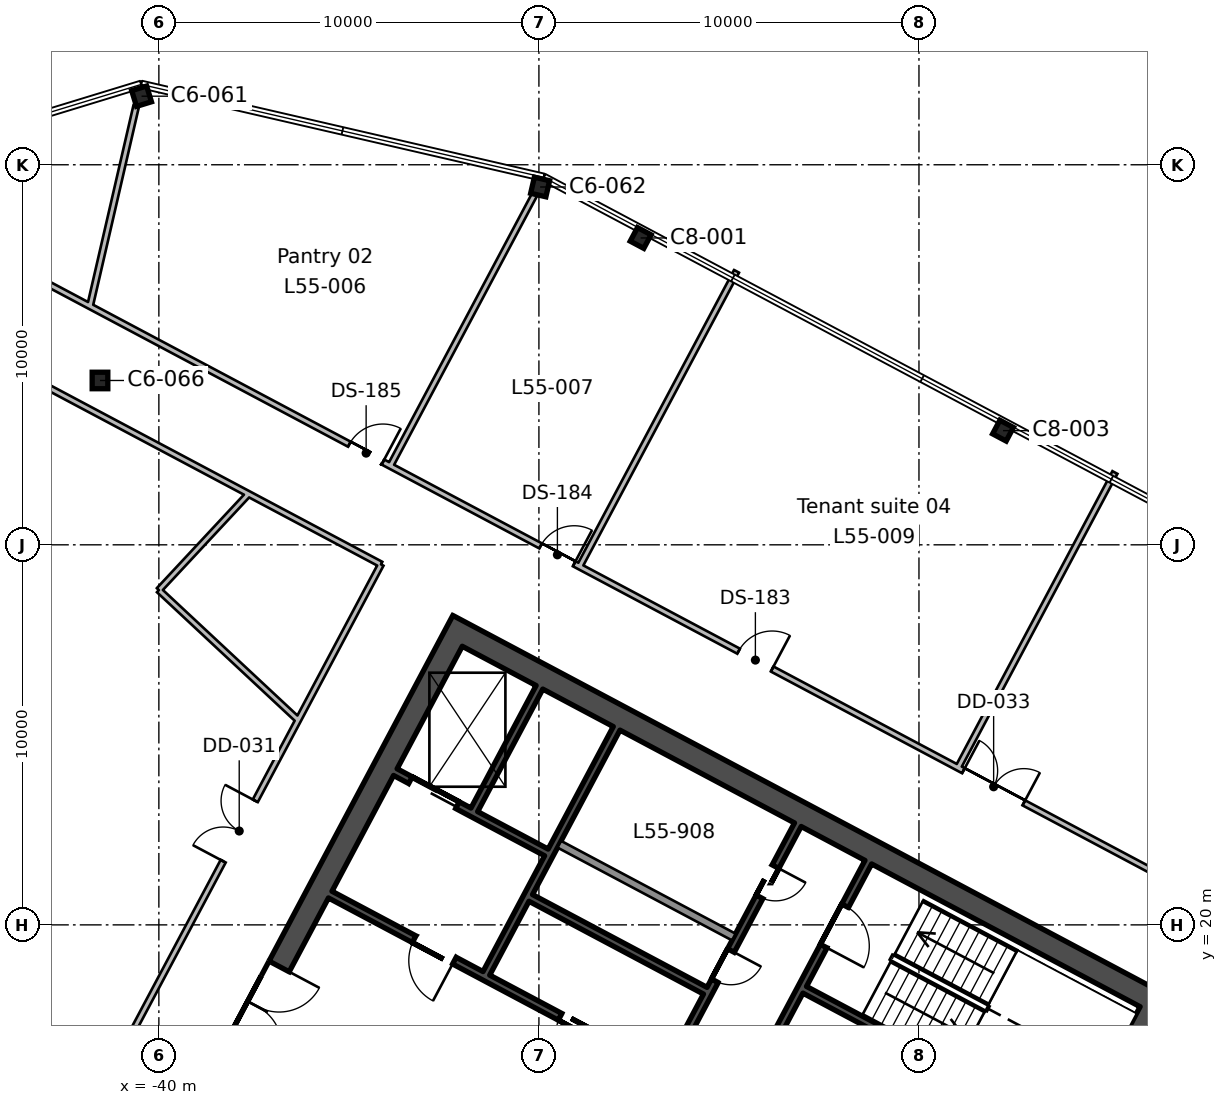
"""IFC4 building model, lengths in metres.
Left out: names, types, materials, properties, quantities, classifications, styles, units other than length and angle.
Written with IfcOpenShell. Run it as: python <this file> out.ifc"""

import sys

from ifc_helpers import new_model, si_unit, direction, frame, frame_2d, origin, origin_2d, place, context, subcontext, project, spatial, rectangle, i_section, extrude, element, fill, save


model = new_model("IFC4")
c1 = context("Model", 3, precision=1e-05, world=origin(), true_north=direction((0.0, 1.0)))
c2 = subcontext(c1, "Body", "Model", "MODEL_VIEW")
j1 = project(units=[si_unit("LENGTHUNIT", "METRE"), si_unit("PLANEANGLEUNIT", "RADIAN")], contexts=[c1])
p1 = place(None, origin())
s1 = spatial("IfcSite", under=j1, at=p1, CompositionType="ELEMENT")
p2 = place(p1, origin())
s2 = spatial("IfcBuilding", under=s1, at=p2, CompositionType="ELEMENT")
p3 = place(p2, frame((0.0, 0.0, 248.1)))
s3 = spatial("IfcBuildingStorey", under=s2, at=p3, CompositionType="ELEMENT", Elevation=248.1)
p4 = place(p3, frame((-17.788, 33.004, 0.0), z_axis=(0.0, 0.0, 1.0), x_axis=(-0.882947592859, 0.469471562786, 0.0)))
e1 = element("IfcColumn", 1, at=p4, inside=s3, PredefinedType="COLUMN", context=c2, shape_type="SweptSolid", body=[
    extrude(i_section(OverallWidth=0.404, OverallDepth=0.406, WebThickness=0.027, FlangeThickness=0.044, FilletRadius=0.015, at=origin_2d()), origin(), (0.0, 0.0, 1.0), 3.9),
])
p5 = place(p3, frame((-41.549, 34.324, 0.0), z_axis=(0.0, 0.0, 1.0), x_axis=(1.0, 0.0, 0.0)))
e2 = element("IfcColumn", 2, at=p5, inside=s3, PredefinedType="COLUMN", context=c2, shape_type="SweptSolid", body=[
    extrude(i_section(OverallWidth=0.412, OverallDepth=0.434, WebThickness=0.036, FlangeThickness=0.057, FilletRadius=0.015, at=origin_2d()), origin(), (0.0, 0.0, 1.0), 3.9),
])
p6 = place(p3, frame((-27.323, 38.074, 0.0), z_axis=(0.0, 0.0, 1.0), x_axis=(-0.882947592859, 0.469471562786, 0.0)))
e3 = element("IfcColumn", 3, at=p6, inside=s3, PredefinedType="COLUMN", context=c2, shape_type="SweptSolid", body=[
    extrude(i_section(OverallWidth=0.404, OverallDepth=0.406, WebThickness=0.027, FlangeThickness=0.044, FilletRadius=0.015, at=origin_2d()), origin(), (0.0, 0.0, 1.0), 3.9),
])
for number, where, z_axis, x_axis in (
    (4, (-29.968, 39.415, 0.0), (0.0, 0.0, 1.0), (-0.974, 0.225, 0.0)),
    (5, (-40.455, 41.804, 0.0), (0.0, 0.0, 1.0), (-0.956, -0.292, 0.0)),
):
    element("IfcColumn", number, at=place(p3, frame(where, z_axis=z_axis, x_axis=x_axis)), inside=s3, PredefinedType="COLUMN", context=c2, shape_type="SweptSolid", body=[
        extrude(i_section(OverallWidth=0.412, OverallDepth=0.434, WebThickness=0.036, FlangeThickness=0.057, FilletRadius=0.015, at=origin_2d()), origin(), (0.0, 0.0, 1.0), 3.9),
    ])
p7 = place(p3, frame((-13.635, 18.236, 0.0), z_axis=(0.0, 0.0, 1.0), x_axis=(-0.469478769487, -0.88294376095, 0.0)))
e6 = element("IfcWall", 6, at=p7, inside=s3, PredefinedType="SHEAR", context=c2, shape_type="SweptSolid", body=[
    extrude(rectangle(XDim=19.4, YDim=0.6, at=frame_2d((9.7, 0.0))), origin(), (0.0, 0.0, 1.0), 3.9),
])
p8 = place(p7, frame((6.7, 0.0, 0.0)))
e7 = element("IfcOpeningElement", 7, at=p8, cuts=e6, PredefinedType="OPENING", context=c2, shape_type="SweptSolid", body=[
    extrude(rectangle(XDim=2.4, YDim=2.4, at=frame_2d((1.2, 1.2))), frame((0.0, 0.31, 0.0), z_axis=(0.0, -1.0, 0.0), x_axis=(1.0, 0.0, 0.0)), (0.0, 0.0, 1.0), 0.62),
])
p9 = place(p3, frame((-32.0, 28.001, 0.0), z_axis=(0.0, 0.0, 1.0), x_axis=(-0.469468958625, -0.882948977511, 0.0)))
e8 = element("IfcWall", 8, at=p9, inside=s3, PredefinedType="SHEAR", context=c2, shape_type="SweptSolid", body=[
    extrude(rectangle(XDim=19.4, YDim=0.6, at=frame_2d((9.7, 0.0))), origin(), (0.0, 0.0, 1.0), 3.9),
])
p10 = place(p9, frame((10.3, 0.0, 0.0)))
e9 = element("IfcOpeningElement", 9, at=p10, cuts=e8, PredefinedType="OPENING", context=c2, shape_type="SweptSolid", body=[
    extrude(rectangle(XDim=2.4, YDim=2.4, at=frame_2d((1.2, 1.2))), frame((0.0, 0.31, 0.0), z_axis=(0.0, -1.0, 0.0), x_axis=(1.0, 0.0, 0.0)), (0.0, 0.0, 1.0), 0.62),
])
p11 = place(p3, frame((-14.041, 18.112, 0.0), z_axis=(0.0, 0.0, 1.0), x_axis=(-0.882947755831, 0.46947125628, 0.0)))
e10 = element("IfcWall", 10, at=p11, inside=s3, PredefinedType="SHEAR", context=c2, shape_type="SweptSolid", body=[
    extrude(rectangle(XDim=20.2, YDim=0.6, at=frame_2d((10.1, 0.0))), origin(), (0.0, 0.0, 1.0), 3.9),
])
p12 = place(p3, frame((-21.333, 21.649, 0.0), z_axis=(0.0, 0.0, 1.0), x_axis=(-0.469494272526, -0.882935517501, 0.0)))
e11 = element("IfcWall", 11, at=p12, inside=s3, PredefinedType="SHEAR", context=c2, shape_type="SweptSolid", body=[
    extrude(rectangle(XDim=7.3, YDim=0.2, at=frame_2d((3.65, 0.0))), origin(), (0.0, 0.0, 1.0), 3.9),
])
p13 = place(p12, frame((1.3, 0.0, 0.0)))
e12 = element("IfcOpeningElement", 12, at=p13, cuts=e11, PredefinedType="OPENING", context=c2, shape_type="SweptSolid", body=[
    extrude(rectangle(XDim=1.2, YDim=2.1, at=frame_2d((0.6, 1.05))), frame((0.0, 0.11, 0.0), z_axis=(0.0, -1.0, 0.0), x_axis=(1.0, 0.0, 0.0)), (0.0, 0.0, 1.0), 0.22),
])
p14 = place(p3, frame((-23.188, 22.635, 0.0), z_axis=(0.0, 0.0, 1.0), x_axis=(-0.469454336211, -0.882956752176, 0.0)))
e13 = element("IfcWall", 13, at=p14, inside=s3, PredefinedType="SHEAR", context=c2, shape_type="SweptSolid", body=[
    extrude(rectangle(XDim=7.3, YDim=0.2, at=frame_2d((3.65, 0.0))), origin(), (0.0, 0.0, 1.0), 3.9),
])
p15 = place(p14, frame((1.25, 0.0, 0.0)))
e14 = element("IfcOpeningElement", 14, at=p15, cuts=e13, PredefinedType="OPENING", context=c2, shape_type="SweptSolid", body=[
    extrude(rectangle(XDim=0.9, YDim=2.1, at=frame_2d((0.45, 1.05))), frame((0.0, 0.11, 0.0), z_axis=(0.0, -1.0, 0.0), x_axis=(1.0, 0.0, 0.0)), (0.0, 0.0, 1.0), 0.22),
])
p16 = place(p14, frame((3.75, 0.0, 0.0)))
e15 = element("IfcOpeningElement", 15, at=p16, cuts=e13, PredefinedType="OPENING", context=c2, shape_type="SweptSolid", body=[
    extrude(rectangle(XDim=0.9, YDim=2.1, at=frame_2d((0.45, 1.05))), frame((0.0, 0.11, 0.0), z_axis=(0.0, -1.0, 0.0), x_axis=(1.0, 0.0, 0.0)), (0.0, 0.0, 1.0), 0.22),
])
p17 = place(p3, frame((-27.955, 25.171, 0.0), z_axis=(0.0, 0.0, 1.0), x_axis=(-0.469480409012, -0.88294288918, 0.0)))
e16 = element("IfcWall", 16, at=p17, inside=s3, PredefinedType="SHEAR", context=c2, shape_type="SweptSolid", body=[
    extrude(rectangle(XDim=7.3, YDim=0.2, at=frame_2d((3.65, 0.0))), origin(), (0.0, 0.0, 1.0), 3.9),
])
p18 = place(p3, frame((-29.986, 26.25, 0.0), z_axis=(0.0, 0.0, 1.0), x_axis=(-0.469494272526, -0.882935517501, 0.0)))
e17 = element("IfcWall", 17, at=p18, inside=s3, PredefinedType="SHEAR", context=c2, shape_type="SweptSolid", body=[
    extrude(rectangle(XDim=3.65, YDim=0.2, at=frame_2d((1.825, 0.0))), origin(), (0.0, 0.0, 1.0), 3.9),
])
p19 = place(p3, frame((-24.872, 19.68, 0.0), z_axis=(0.0, 0.0, 1.0), x_axis=(-0.882953967957, 0.469459572775, 0.0)))
e18 = element("IfcWall", 18, at=p19, inside=s3, PredefinedType="SOLIDWALL", context=c2, shape_type="SweptSolid", body=[
    extrude(rectangle(XDim=5.2, YDim=0.2, at=frame_2d((2.6, 0.0))), origin(), (0.0, 0.0, 1.0), 3.9),
])
p20 = place(p3, frame((-15.942, 14.536, 0.0), z_axis=(0.0, 0.0, 1.0), x_axis=(-0.882946947542, 0.469472776449, 0.0)))
e19 = element("IfcWall", 19, at=p20, inside=s3, PredefinedType="SHEAR", context=c2, shape_type="SweptSolid", body=[
    extrude(rectangle(XDim=8.0, YDim=0.2, at=frame_2d((4.0, 0.0))), origin(), (0.0, 0.0, 1.0), 3.9),
])
p21 = place(p3, frame((-29.804, 21.906, 0.0), z_axis=(0.0, 0.0, 1.0), x_axis=(-0.882960433586, 0.469447412093, 0.0)))
e20 = element("IfcWall", 20, at=p21, inside=s3, PredefinedType="SHEAR", context=c2, shape_type="SweptSolid", body=[
    extrude(rectangle(XDim=4.5, YDim=0.2, at=frame_2d((2.25, 0.0))), origin(), (0.0, 0.0, 1.0), 3.9),
])
p22 = place(p21, frame((2.65, 0.0, 0.0)))
e21 = element("IfcOpeningElement", 21, at=p22, cuts=e20, PredefinedType="OPENING", context=c2, shape_type="SweptSolid", body=[
    extrude(rectangle(XDim=1.4, YDim=2.4, at=frame_2d((0.7, 1.2))), frame((0.0, 0.11, 0.0), z_axis=(0.0, -1.0, 0.0), x_axis=(1.0, 0.0, 0.0)), (0.0, 0.0, 1.0), 0.22),
])
p23 = place(p3, frame((-25.623, 18.268, 0.0), z_axis=(0.0, 0.0, 1.0), x_axis=(-0.882953967957, 0.469459572775, 0.0)))
e22 = element("IfcWall", 22, at=p23, inside=s3, PredefinedType="SHEAR", context=c2, shape_type="SweptSolid", body=[
    extrude(rectangle(XDim=5.2, YDim=0.2, at=frame_2d((2.6, 0.0))), origin(), (0.0, 0.0, 1.0), 3.9),
])
p24 = place(p3, frame((-26.662, 16.102, 0.0), z_axis=(0.0, 0.0, 1.0), x_axis=(-0.882940221191, 0.469485426614, 0.0)))
e23 = element("IfcWall", 23, at=p24, inside=s3, PredefinedType="SHEAR", context=c2, shape_type="SweptSolid", body=[
    extrude(rectangle(XDim=10.0, YDim=0.2, at=frame_2d((5.0, 0.0))), origin(), (0.0, 0.0, 1.0), 3.9),
])
p25 = place(p24, frame((6.3, 0.0, 0.0)))
e24 = element("IfcOpeningElement", 24, at=p25, cuts=e23, PredefinedType="OPENING", context=c2, shape_type="SweptSolid", body=[
    extrude(rectangle(XDim=1.2, YDim=2.1, at=frame_2d((0.6, 1.05))), frame((0.0, 0.11, 0.0), z_axis=(0.0, -1.0, 0.0), x_axis=(1.0, 0.0, 0.0)), (0.0, 0.0, 1.0), 0.22),
])
p26 = place(p24, frame((2.25, 0.0, 0.0)))
e25 = element("IfcOpeningElement", 25, at=p26, cuts=e23, PredefinedType="OPENING", context=c2, shape_type="SweptSolid", body=[
    extrude(rectangle(XDim=0.9, YDim=2.1, at=frame_2d((0.45, 1.05))), frame((0.0, 0.11, 0.0), z_axis=(0.0, -1.0, 0.0), x_axis=(1.0, 0.0, 0.0)), (0.0, 0.0, 1.0), 0.22),
])
p27 = place(p3, frame((-60.162, 20.265, 0.0), z_axis=(0.0, 0.0, 1.0), x_axis=(0.974367298847, -0.224963034603, 0.0)))
e26 = element("IfcWall", 26, at=p27, inside=s3, PredefinedType="PARTITIONING", context=c2, shape_type="SweptSolid", body=[
    extrude(rectangle(XDim=18.256, YDim=0.15, at=frame_2d((9.128, 0.0))), origin(), (0.0, 0.0, 1.0), 3.45),
])
p28 = place(p3, frame((-37.64, 31.339, 0.0), z_axis=(0.0, 0.0, 1.0), x_axis=(-0.681983873773, -0.731367210035, 0.0)))
e27 = element("IfcWall", 27, at=p28, inside=s3, PredefinedType="PARTITIONING", context=c2, shape_type="SweptSolid", body=[
    extrude(rectangle(XDim=3.461, YDim=0.15, at=frame_2d((1.73, 0.0))), origin(), (0.0, 0.0, 1.0), 3.45),
])
p29 = place(p3, frame((-40.0, 28.808, 0.0), z_axis=(0.0, 0.0, 1.0), x_axis=(0.731199369693, -0.682163823257, 0.0)))
e28 = element("IfcWall", 28, at=p29, inside=s3, PredefinedType="PARTITIONING", context=c2, shape_type="SweptSolid", body=[
    extrude(rectangle(XDim=5.014, YDim=0.15, at=frame_2d((2.507, 0.0))), origin(), (0.0, 0.0, 1.0), 3.45),
])
p30 = place(p3, frame((-41.617, 15.452, 0.0), z_axis=(0.0, 0.0, 1.0), x_axis=(-0.731394449571, 0.681954660617, 0.0)))
e29 = element("IfcWall", 29, at=p30, inside=s3, PredefinedType="PARTITIONING", context=c2, shape_type="SweptSolid", body=[
    extrude(rectangle(XDim=22.207, YDim=0.15, at=frame_2d((11.104, 0.0))), origin(), (0.0, 0.0, 1.0), 3.45),
])
p31 = place(p3, frame((-41.618, 15.45, 0.0), z_axis=(0.0, 0.0, 1.0), x_axis=(0.46945912711, 0.882954204913, 0.0)))
e30 = element("IfcWall", 30, at=p31, inside=s3, PredefinedType="PARTITIONING", context=c2, shape_type="SweptSolid", body=[
    extrude(rectangle(XDim=15.897, YDim=0.15, at=frame_2d((7.948, 0.0))), origin(), (0.0, 0.0, 1.0), 3.45),
])
p32 = place(p31, frame((7.05, 0.0, 0.0)))
e31 = element("IfcOpeningElement", 31, at=p32, cuts=e30, PredefinedType="OPENING", context=c2, shape_type="SweptSolid", body=[
    extrude(rectangle(XDim=1.8, YDim=2.1, at=frame_2d((0.9, 1.05))), frame((0.0, 0.085, 0.0), z_axis=(0.0, -1.0, 0.0), x_axis=(1.0, 0.0, 0.0)), (0.0, 0.0, 1.0), 0.17),
])
p33 = place(p3, frame((-34.155, 29.486, 0.0), z_axis=(0.0, 0.0, 1.0), x_axis=(-0.882941970897, 0.469482136006, 0.0)))
e32 = element("IfcWall", 32, at=p33, inside=s3, PredefinedType="PARTITIONING", context=c2, shape_type="SweptSolid", body=[
    extrude(rectangle(XDim=19.528, YDim=0.15, at=frame_2d((9.764, 0.0))), origin(), (0.0, 0.0, 1.0), 3.45),
])
p34 = place(p3, frame((-48.541, 39.854, 0.0), z_axis=(0.0, 0.0, 1.0), x_axis=(0.882945008423, -0.469476423372, 0.0)))
e33 = element("IfcWall", 33, at=p34, inside=s3, PredefinedType="PARTITIONING", context=c2, shape_type="SweptSolid", body=[
    extrude(rectangle(XDim=54.976, YDim=0.15, at=frame_2d((27.488, 0.0))), origin(), (0.0, 0.0, 1.0), 3.45),
])
p35 = place(p34, frame((33.65, 0.0, 0.0)))
e34 = element("IfcOpeningElement", 34, at=p35, cuts=e33, PredefinedType="OPENING", context=c2, shape_type="SweptSolid", body=[
    extrude(rectangle(XDim=1.8, YDim=2.1, at=frame_2d((0.9, 1.05))), frame((0.0, 0.085, 0.0), z_axis=(0.0, -1.0, 0.0), x_axis=(1.0, 0.0, 0.0)), (0.0, 0.0, 1.0), 0.17),
])
p36 = place(p34, frame((26.95, 0.0, 0.0)))
e35 = element("IfcOpeningElement", 35, at=p36, cuts=e33, PredefinedType="OPENING", context=c2, shape_type="SweptSolid", body=[
    extrude(rectangle(XDim=1.0, YDim=2.1, at=frame_2d((0.5, 1.05))), frame((0.0, 0.085, 0.0), z_axis=(0.0, -1.0, 0.0), x_axis=(1.0, 0.0, 0.0)), (0.0, 0.0, 1.0), 0.17),
])
p37 = place(p34, frame((21.05, 0.0, 0.0)))
e36 = element("IfcOpeningElement", 36, at=p37, cuts=e33, PredefinedType="OPENING", context=c2, shape_type="SweptSolid", body=[
    extrude(rectangle(XDim=1.0, YDim=2.1, at=frame_2d((0.5, 1.05))), frame((0.0, 0.085, 0.0), z_axis=(0.0, -1.0, 0.0), x_axis=(1.0, 0.0, 0.0)), (0.0, 0.0, 1.0), 0.17),
])
p38 = place(p34, frame((15.35, 0.0, 0.0)))
e37 = element("IfcOpeningElement", 37, at=p38, cuts=e33, PredefinedType="OPENING", context=c2, shape_type="SweptSolid", body=[
    extrude(rectangle(XDim=1.0, YDim=2.1, at=frame_2d((0.5, 1.05))), frame((0.0, 0.085, 0.0), z_axis=(0.0, -1.0, 0.0), x_axis=(1.0, 0.0, 0.0)), (0.0, 0.0, 1.0), 0.17),
])
p39 = place(p3, frame((-30.109, 39.225, 0.0), z_axis=(0.0, 0.0, 1.0), x_axis=(-0.469490973279, -0.882937271843, 0.0)))
e38 = element("IfcWall", 38, at=p39, inside=s3, PredefinedType="PARTITIONING", context=c2, shape_type="SweptSolid", body=[
    extrude(rectangle(XDim=8.098, YDim=0.15, at=frame_2d((4.049, 0.0))), origin(), (0.0, 0.0, 1.0), 3.45),
])
p40 = place(p3, frame((-41.813, 36.276, 0.0), z_axis=(0.0, 0.0, 1.0), x_axis=(0.22495163737, 0.974369930183, 0.0)))
e39 = element("IfcWall", 39, at=p40, inside=s3, PredefinedType="PARTITIONING", context=c2, shape_type="SweptSolid", body=[
    extrude(rectangle(XDim=5.419, YDim=0.15, at=frame_2d((2.709, 0.0))), origin(), (0.0, 0.0, 1.0), 3.45),
])
p41 = place(p3, frame((-24.8, 37.197, 0.0), z_axis=(0.0, 0.0, 1.0), x_axis=(-0.469510830369, -0.882926712794, 0.0)))
e40 = element("IfcWall", 40, at=p41, inside=s3, PredefinedType="PARTITIONING", context=c2, shape_type="SweptSolid", body=[
    extrude(rectangle(XDim=8.8, YDim=0.15, at=frame_2d((4.4, 0.0))), origin(), (0.0, 0.0, 1.0), 3.45),
])
p42 = place(p3, frame((-14.844, 31.903, 0.0), z_axis=(0.0, 0.0, 1.0), x_axis=(-0.469359422187, -0.883007209939, 0.0)))
e41 = element("IfcWall", 41, at=p42, inside=s3, PredefinedType="PARTITIONING", context=c2, shape_type="SweptSolid", body=[
    extrude(rectangle(XDim=8.8, YDim=0.15, at=frame_2d((4.4, 0.0))), origin(), (0.0, 0.0, 1.0), 3.45),
])
p43 = place(p10, origin())
e42 = element("IfcDoor", 42, at=p43, inside=s3, OperationType="DOUBLE_DOOR_SINGLE_SWING", PredefinedType="DOOR", context=c2, shape_type="SweptSolid", body=[
    extrude(rectangle(XDim=2.4, YDim=2.4, at=frame_2d((1.2, 1.2))), frame((0.0, 0.025, 0.0), z_axis=(0.0, -1.0, 0.0), x_axis=(1.0, 0.0, 0.0)), (0.0, 0.0, 1.0), 0.05),
])
fill(e9, e42)
p44 = place(p25, origin())
e43 = element("IfcDoor", 43, at=p44, inside=s3, OperationType="SINGLE_SWING_LEFT", PredefinedType="DOOR", context=c2, shape_type="SweptSolid", body=[
    extrude(rectangle(XDim=1.2, YDim=2.1, at=frame_2d((0.6, 1.05))), frame((0.0, 0.025, 0.0), z_axis=(0.0, -1.0, 0.0), x_axis=(1.0, 0.0, 0.0)), (0.0, 0.0, 1.0), 0.05),
])
fill(e24, e43)
p45 = place(p13, origin())
e44 = element("IfcDoor", 44, at=p45, inside=s3, OperationType="SINGLE_SWING_RIGHT", PredefinedType="DOOR", context=c2, shape_type="SweptSolid", body=[
    extrude(rectangle(XDim=1.2, YDim=2.1, at=frame_2d((0.6, 1.05))), frame((0.0, 0.025, 0.0), z_axis=(0.0, -1.0, 0.0), x_axis=(1.0, 0.0, 0.0)), (0.0, 0.0, 1.0), 0.05),
])
fill(e12, e44)
p46 = place(p26, origin())
e45 = element("IfcDoor", 45, at=p46, inside=s3, OperationType="SINGLE_SWING_LEFT", PredefinedType="DOOR", context=c2, shape_type="SweptSolid", body=[
    extrude(rectangle(XDim=0.9, YDim=2.1, at=frame_2d((0.45, 1.05))), frame((0.0, 0.025, 0.0), z_axis=(0.0, -1.0, 0.0), x_axis=(1.0, 0.0, 0.0)), (0.0, 0.0, 1.0), 0.05),
])
fill(e25, e45)
p47 = place(p22, origin())
e46 = element("IfcDoor", 46, at=p47, inside=s3, OperationType="DOUBLE_DOOR_SLIDING", PredefinedType="DOOR", context=c2, shape_type="SweptSolid", body=[
    extrude(rectangle(XDim=1.4, YDim=2.4, at=frame_2d((0.7, 1.2))), frame((0.0, 0.025, 0.0), z_axis=(0.0, -1.0, 0.0), x_axis=(1.0, 0.0, 0.0)), (0.0, 0.0, 1.0), 0.05),
])
fill(e21, e46)
p48 = place(p15, origin())
e47 = element("IfcDoor", 47, at=p48, inside=s3, OperationType="SINGLE_SWING_LEFT", PredefinedType="DOOR", context=c2, shape_type="SweptSolid", body=[
    extrude(rectangle(XDim=0.9, YDim=2.1, at=frame_2d((0.45, 1.05))), frame((0.0, 0.025, 0.0), z_axis=(0.0, -1.0, 0.0), x_axis=(1.0, 0.0, 0.0)), (0.0, 0.0, 1.0), 0.05),
])
fill(e14, e47)
p49 = place(p16, origin())
e48 = element("IfcDoor", 48, at=p49, inside=s3, OperationType="SINGLE_SWING_LEFT", PredefinedType="DOOR", context=c2, shape_type="SweptSolid", body=[
    extrude(rectangle(XDim=0.9, YDim=2.1, at=frame_2d((0.45, 1.05))), frame((0.0, 0.025, 0.0), z_axis=(0.0, -1.0, 0.0), x_axis=(1.0, 0.0, 0.0)), (0.0, 0.0, 1.0), 0.05),
])
fill(e15, e48)
p50 = place(p32, origin())
e49 = element("IfcDoor", 49, at=p50, inside=s3, OperationType="DOUBLE_DOOR_SINGLE_SWING", PredefinedType="DOOR", context=c2, shape_type="SweptSolid", body=[
    extrude(rectangle(XDim=1.8, YDim=2.1, at=frame_2d((0.9, 1.05))), frame((0.0, 0.025, 0.0), z_axis=(0.0, -1.0, 0.0), x_axis=(1.0, 0.0, 0.0)), (0.0, 0.0, 1.0), 0.05),
])
fill(e31, e49)
p51 = place(p35, origin())
e50 = element("IfcDoor", 50, at=p51, inside=s3, OperationType="DOUBLE_DOOR_SINGLE_SWING", PredefinedType="DOOR", context=c2, shape_type="SweptSolid", body=[
    extrude(rectangle(XDim=1.8, YDim=2.1, at=frame_2d((0.9, 1.05))), frame((0.0, 0.025, 0.0), z_axis=(0.0, -1.0, 0.0), x_axis=(1.0, 0.0, 0.0)), (0.0, 0.0, 1.0), 0.05),
])
fill(e34, e50)
p52 = place(p36, origin())
e51 = element("IfcDoor", 51, at=p52, inside=s3, OperationType="SINGLE_SWING_RIGHT", PredefinedType="DOOR", context=c2, shape_type="SweptSolid", body=[
    extrude(rectangle(XDim=1.0, YDim=2.1, at=frame_2d((0.5, 1.05))), frame((0.0, 0.025, 0.0), z_axis=(0.0, -1.0, 0.0), x_axis=(1.0, 0.0, 0.0)), (0.0, 0.0, 1.0), 0.05),
])
fill(e35, e51)
p53 = place(p37, origin())
e52 = element("IfcDoor", 52, at=p53, inside=s3, OperationType="SINGLE_SWING_RIGHT", PredefinedType="DOOR", context=c2, shape_type="SweptSolid", body=[
    extrude(rectangle(XDim=1.0, YDim=2.1, at=frame_2d((0.5, 1.05))), frame((0.0, 0.025, 0.0), z_axis=(0.0, -1.0, 0.0), x_axis=(1.0, 0.0, 0.0)), (0.0, 0.0, 1.0), 0.05),
])
fill(e36, e52)
p54 = place(p38, origin())
e53 = element("IfcDoor", 53, at=p54, inside=s3, OperationType="SINGLE_SWING_RIGHT", PredefinedType="DOOR", context=c2, shape_type="SweptSolid", body=[
    extrude(rectangle(XDim=1.0, YDim=2.1, at=frame_2d((0.5, 1.05))), frame((0.0, 0.025, 0.0), z_axis=(0.0, -1.0, 0.0), x_axis=(1.0, 0.0, 0.0)), (0.0, 0.0, 1.0), 0.05),
])
fill(e37, e53)
save(model, sys.argv[1])
